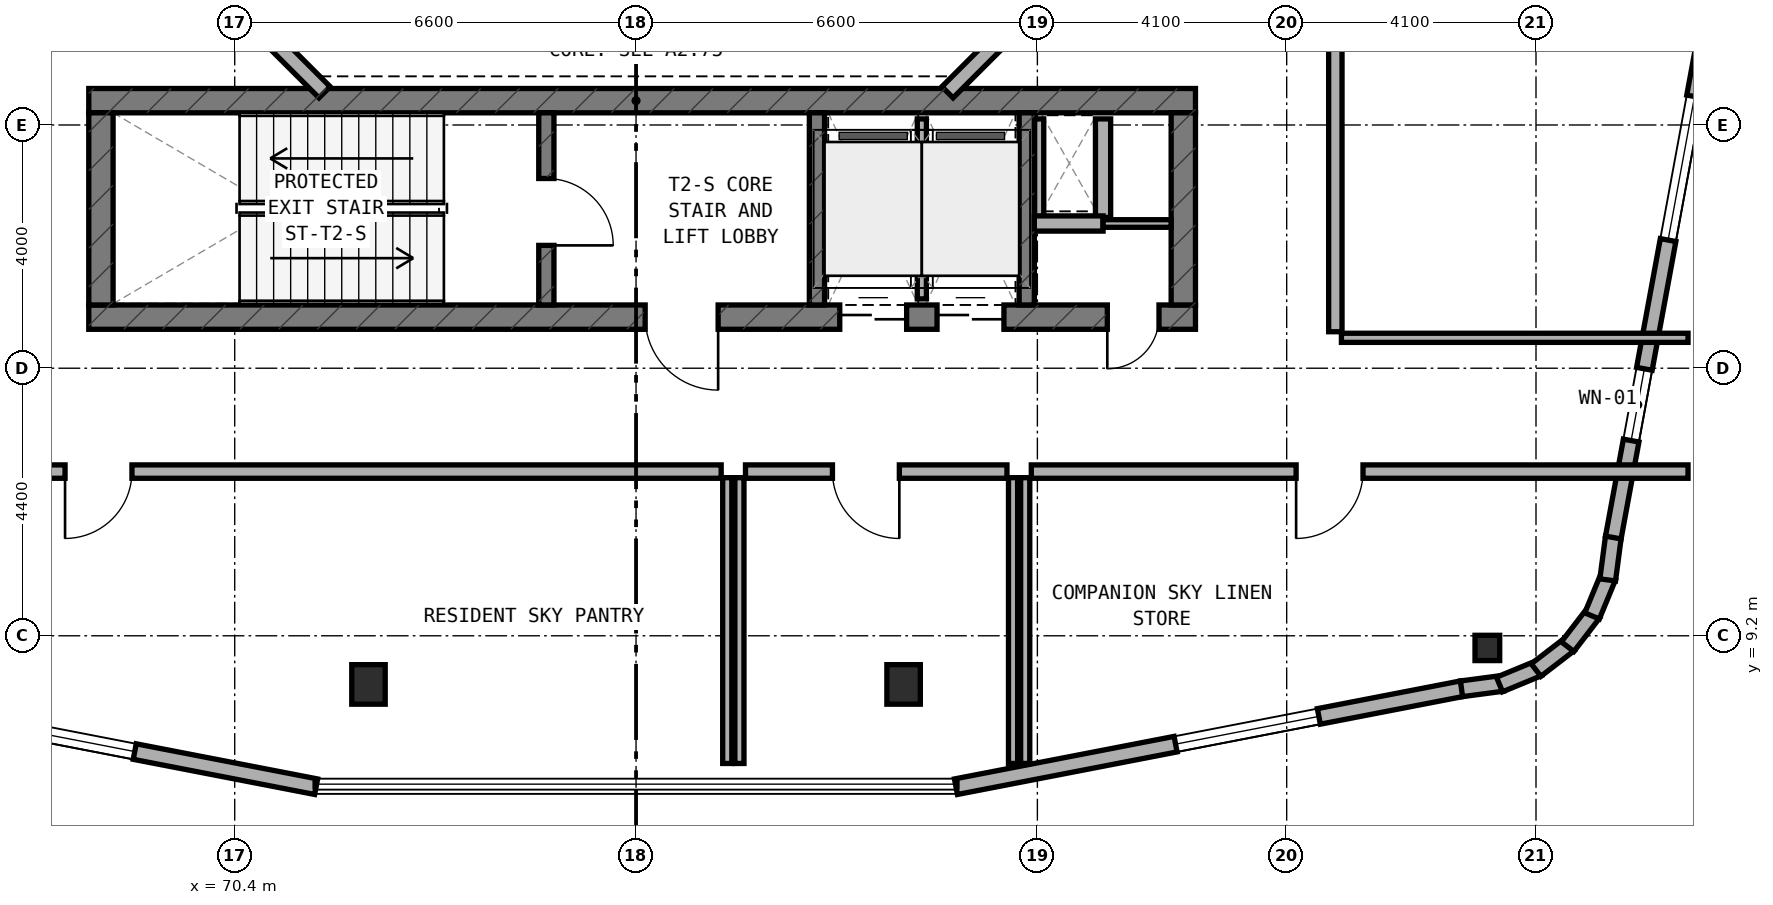
"""IFC4 building model, lengths in metres.
Left out: names, types, materials, properties, quantities, classifications, styles, units other than length and angle.
Written with IfcOpenShell. Run it as: python <this file> out.ifc"""

import sys

from ifc_helpers import new_model, si_unit, direction, frame, frame_2d, origin, origin_2d, place, context, subcontext, project, spatial, rectangle, i_section, extrude, element, fill, save


model = new_model("IFC4")
c1 = context("Model", 3, precision=1e-05, world=origin(), true_north=direction((0.0, 1.0)))
c2 = subcontext(c1, "Body", "Model", "MODEL_VIEW")
j1 = project(units=[si_unit("LENGTHUNIT", "METRE"), si_unit("PLANEANGLEUNIT", "RADIAN")], contexts=[c1])
p1 = place(None, origin())
s1 = spatial("IfcSite", under=j1, at=p1, CompositionType="ELEMENT")
p2 = place(p1, origin())
s2 = spatial("IfcBuilding", under=s1, at=p2, CompositionType="ELEMENT")
p3 = place(p2, frame((0.0, 0.0, 119.5)))
s3 = spatial("IfcBuildingStorey", under=s2, at=p3, CompositionType="ELEMENT", Elevation=119.5)
p4 = place(p3, frame((68.0, 14.44, 0.0), z_axis=(0.0, 0.0, 1.0), x_axis=(1.0, 0.0, 0.0)))
e1 = element("IfcWall", 1, at=p4, inside=s3, PredefinedType="SHEAR", context=c2, shape_type="SweptSolid", body=[
    extrude(rectangle(XDim=18.2, YDim=0.4, at=frame_2d((9.1, 0.0))), origin(), (0.0, 0.0, 1.0), 4.5),
])
p5 = place(p4, frame((9.15, 0.0, 0.0)))
e2 = element("IfcOpeningElement", 2, at=p5, cuts=e1, PredefinedType="OPENING", context=c2, shape_type="SweptSolid", body=[
    extrude(rectangle(XDim=1.2, YDim=2.15, at=frame_2d((0.6, 1.075))), frame((0.0, 0.21, 0.0), z_axis=(0.0, -1.0, 0.0), x_axis=(1.0, 0.0, 0.0)), (0.0, 0.0, 1.0), 0.42),
])
p6 = place(p4, frame((16.75, 0.0, 0.0)))
e3 = element("IfcOpeningElement", 3, at=p6, cuts=e1, PredefinedType="OPENING", context=c2, shape_type="SweptSolid", body=[
    extrude(rectangle(XDim=0.85, YDim=2.1, at=frame_2d((0.425, 1.05))), frame((0.0, 0.21, 0.0), z_axis=(0.0, -1.0, 0.0), x_axis=(1.0, 0.0, 0.0)), (0.0, 0.0, 1.0), 0.42),
])
p7 = place(p4, frame((12.35, 0.0, 0.0)))
e4 = element("IfcOpeningElement", 4, at=p7, cuts=e1, PredefinedType="OPENING", context=c2, shape_type="SweptSolid", body=[
    extrude(rectangle(XDim=1.1, YDim=2.15, at=frame_2d((0.55, 1.075))), frame((0.0, 0.21, 0.0), z_axis=(0.0, -1.0, 0.0), x_axis=(1.0, 0.0, 0.0)), (0.0, 0.0, 1.0), 0.42),
])
p8 = place(p4, frame((13.95, 0.0, 0.0)))
e5 = element("IfcOpeningElement", 5, at=p8, cuts=e1, PredefinedType="OPENING", context=c2, shape_type="SweptSolid", body=[
    extrude(rectangle(XDim=1.1, YDim=2.15, at=frame_2d((0.55, 1.075))), frame((0.0, 0.21, 0.0), z_axis=(0.0, -1.0, 0.0), x_axis=(1.0, 0.0, 0.0)), (0.0, 0.0, 1.0), 0.42),
])
p9 = place(p3, frame((68.0, 18.0, 0.0), z_axis=(0.0, 0.0, 1.0), x_axis=(1.0, 0.0, 0.0)))
e6 = element("IfcWall", 6, at=p9, inside=s3, PredefinedType="SHEAR", context=c2, shape_type="SweptSolid", body=[
    extrude(rectangle(XDim=18.2, YDim=0.4, at=frame_2d((9.1, 0.0))), origin(), (0.0, 0.0, 1.0), 4.5),
])
for number, where, z_axis, x_axis in (
    (7, (68.2, 14.64, 0.0), (0.0, 0.0, 1.0), (0.0, 1.0, 0.0)),
    (8, (86.0, 14.64, 0.0), (0.0, 0.0, 1.0), (0.0, 1.0, 0.0)),
):
    element("IfcWall", number, at=place(p3, frame(where, z_axis=z_axis, x_axis=x_axis)), inside=s3, PredefinedType="SHEAR", context=c2, shape_type="SweptSolid", body=[
        extrude(rectangle(XDim=3.16, YDim=0.4, at=frame_2d((1.58, 0.0))), origin(), (0.0, 0.0, 1.0), 4.5),
    ])
p10 = place(p3, frame((75.525, 14.64, 0.0), z_axis=(0.0, 0.0, 1.0), x_axis=(0.0, 1.0, 0.0)))
e9 = element("IfcWall", 9, at=p10, inside=s3, PredefinedType="STANDARD", context=c2, shape_type="SweptSolid", body=[
    extrude(rectangle(XDim=3.16, YDim=0.25, at=frame_2d((1.58, 0.0))), origin(), (0.0, 0.0, 1.0), 4.25),
])
p11 = place(p10, frame((0.98, 0.0, 0.0)))
e10 = element("IfcOpeningElement", 10, at=p11, cuts=e9, PredefinedType="OPENING", context=c2, shape_type="SweptSolid", body=[
    extrude(rectangle(XDim=1.1, YDim=2.15, at=frame_2d((0.55, 1.075))), frame((0.0, 0.135, 0.0), z_axis=(0.0, -1.0, 0.0), x_axis=(1.0, 0.0, 0.0)), (0.0, 0.0, 1.0), 0.27),
])
for number, where, z_axis, x_axis in (
    (11, (79.975, 14.64, 0.0), (0.0, 0.0, 1.0), (0.0, 1.0, 0.0)),
    (12, (83.425, 14.64, 0.0), (0.0, 0.0, 1.0), (0.0, 1.0, 0.0)),
):
    element("IfcWall", number, at=place(p3, frame(where, z_axis=z_axis, x_axis=x_axis)), inside=s3, PredefinedType="STANDARD", context=c2, shape_type="SweptSolid", body=[
        extrude(rectangle(XDim=3.16, YDim=0.25, at=frame_2d((1.58, 0.0))), origin(), (0.0, 0.0, 1.0), 4.25),
    ])
for number, where, z_axis, x_axis in (
    (13, (72.6, 8.4, 0.0), (0.0, 0.0, 1.0), (1.0, 0.0, 0.0)),
    (14, (81.4, 8.4, 0.0), (0.0, 0.0, 1.0), (1.0, 0.0, 0.0)),
):
    element("IfcColumn", number, at=place(p3, frame(where, z_axis=z_axis, x_axis=x_axis)), inside=s3, PredefinedType="COLUMN", context=c2, shape_type="SweptSolid", body=[
        extrude(rectangle(XDim=0.55, YDim=0.65, at=origin_2d()), origin(), (0.0, 0.0, 1.0), 4.5),
    ])
p12 = place(p3, frame((91.0, 9.0, 0.0), z_axis=(0.0, 0.0, 1.0), x_axis=(1.0, 0.0, 0.0)))
e15 = element("IfcColumn", 15, at=p12, inside=s3, PredefinedType="COLUMN", context=c2, shape_type="SweptSolid", body=[
    extrude(i_section(OverallWidth=0.406, OverallDepth=0.416, WebThickness=0.024, FlangeThickness=0.039, FilletRadius=0.015, at=origin_2d()), origin(), (0.0, 0.0, 1.0), 4.5),
])
p13 = place(p3, frame((63.417, 8.33, 0.0), z_axis=(0.0, 0.0, 1.0), x_axis=(0.981750199588, -0.190175039396, 0.0)))
e16 = element("IfcWall", 16, at=p13, inside=s3, PredefinedType="STANDARD", context=c2, shape_type="SweptSolid", body=[
    extrude(rectangle(XDim=8.477, YDim=0.26, at=frame_2d((4.238, 0.0))), origin(), (0.0, 0.0, 1.0), 4.25),
])
p14 = place(p13, frame((3.038, 0.0, 0.8)))
e17 = element("IfcOpeningElement", 17, at=p14, cuts=e16, PredefinedType="OPENING", context=c2, shape_type="SweptSolid", body=[
    extrude(rectangle(XDim=2.4, YDim=1.6, at=frame_2d((1.2, 0.8))), frame((0.0, 0.14, 0.0), z_axis=(0.0, -1.0, 0.0), x_axis=(1.0, 0.0, 0.0)), (0.0, 0.0, 1.0), 0.28),
])
p15 = place(p3, frame((82.261, 6.718, 0.0), z_axis=(0.0, 0.0, 1.0), x_axis=(0.981750199588, 0.190175039396, 0.0)))
e18 = element("IfcWall", 18, at=p15, inside=s3, PredefinedType="STANDARD", context=c2, shape_type="SweptSolid", body=[
    extrude(rectangle(XDim=8.477, YDim=0.26, at=frame_2d((4.238, 0.0))), origin(), (0.0, 0.0, 1.0), 4.25),
])
p16 = place(p15, frame((3.679, 0.0, 0.8)))
e19 = element("IfcOpeningElement", 19, at=p16, cuts=e18, PredefinedType="OPENING", context=c2, shape_type="SweptSolid", body=[
    extrude(rectangle(XDim=2.4, YDim=1.6, at=frame_2d((1.2, 0.8))), frame((0.0, 0.14, 0.0), z_axis=(0.0, -1.0, 0.0), x_axis=(1.0, 0.0, 0.0)), (0.0, 0.0, 1.0), 0.28),
])
p17 = place(p3, frame((90.575, 8.328, 0.0), z_axis=(0.0, 0.0, 1.0), x_axis=(0.991300187529, 0.13162043232, 0.0)))
e20 = element("IfcWall", 20, at=p17, inside=s3, PredefinedType="STANDARD", context=c2, shape_type="SweptSolid", body=[
    extrude(rectangle(XDim=0.677, YDim=0.26, at=frame_2d((0.338, 0.0))), origin(), (0.0, 0.0, 1.0), 4.25),
])
for number, where, z_axis, x_axis in (
    (21, (91.2, 8.399, 0.0), (0.0, 0.0, 1.0), (0.924, 0.382, 0.0)),
    (22, (91.801, 8.636, 0.0), (0.0, 0.0, 1.0), (0.793, 0.61, 0.0)),
    (23, (92.32, 9.021, 0.0), (0.0, 0.0, 1.0), (0.609, 0.793, 0.0)),
):
    element("IfcWall", number, at=place(p3, frame(where, z_axis=z_axis, x_axis=x_axis)), inside=s3, PredefinedType="STANDARD", context=c2, shape_type="SweptSolid", body=[
        extrude(rectangle(XDim=0.694, YDim=0.26, at=frame_2d((0.347, 0.0))), origin(), (0.0, 0.0, 1.0), 4.25),
    ])
p18 = place(p3, frame((92.722, 9.527, 0.0), z_axis=(0.0, 0.0, 1.0), x_axis=(0.382289608286, 0.924042561464, 0.0)))
e24 = element("IfcWall", 24, at=p18, inside=s3, PredefinedType="STANDARD", context=c2, shape_type="SweptSolid", body=[
    extrude(rectangle(XDim=0.694, YDim=0.26, at=frame_2d((0.347, 0.0))), origin(), (0.0, 0.0, 1.0), 4.25),
])
p19 = place(p3, frame((92.979, 10.119, 0.0), z_axis=(0.0, 0.0, 1.0), x_axis=(0.130614135366, 0.991433279471, 0.0)))
e25 = element("IfcWall", 25, at=p19, inside=s3, PredefinedType="STANDARD", context=c2, shape_type="SweptSolid", body=[
    extrude(rectangle(XDim=0.712, YDim=0.26, at=frame_2d((0.356, 0.0))), origin(), (0.0, 0.0, 1.0), 4.25),
])
p20 = place(p3, frame((93.071, 10.816, 0.0), z_axis=(0.0, 0.0, 1.0), x_axis=(0.181209963057, 0.983444431215, 0.0)))
e26 = element("IfcWall", 26, at=p20, inside=s3, PredefinedType="STANDARD", context=c2, shape_type="SweptSolid", body=[
    extrude(rectangle(XDim=8.889, YDim=0.26, at=frame_2d((4.445, 0.0))), origin(), (0.0, 0.0, 1.0), 4.25),
])
p21 = place(p20, frame((1.621, 0.0, 0.85)))
e27 = element("IfcOpeningElement", 27, at=p21, cuts=e26, PredefinedType="OPENING", context=c2, shape_type="SweptSolid", body=[
    extrude(rectangle(XDim=1.2, YDim=1.5, at=frame_2d((0.6, 0.75))), frame((0.0, 0.14, 0.0), z_axis=(0.0, -1.0, 0.0), x_axis=(1.0, 0.0, 0.0)), (0.0, 0.0, 1.0), 0.28),
])
p22 = place(p20, frame((4.974, 0.0, 0.8)))
e28 = element("IfcOpeningElement", 28, at=p22, cuts=e26, PredefinedType="OPENING", context=c2, shape_type="SweptSolid", body=[
    extrude(rectangle(XDim=2.4, YDim=1.6, at=frame_2d((1.2, 0.8))), frame((0.0, 0.14, 0.0), z_axis=(0.0, -1.0, 0.0), x_axis=(1.0, 0.0, 0.0)), (0.0, 0.0, 1.0), 0.28),
])
for number, where, z_axis, x_axis in (
    (29, (82.122, 18.138, 0.0), (0.0, 0.0, 1.0), (0.707, 0.707, 0.0)),
    (30, (70.244, 19.772, 0.0), (0.0, 0.0, 1.0), (0.707, -0.707, 0.0)),
):
    element("IfcWall", number, at=place(p3, frame(where, z_axis=z_axis, x_axis=x_axis)), inside=s3, PredefinedType="STANDARD", context=c2, shape_type="SweptSolid", body=[
        extrude(rectangle(XDim=2.311, YDim=0.26, at=frame_2d((1.155, 0.0))), origin(), (0.0, 0.0, 1.0), 4.25),
    ])
p23 = place(p3, frame((83.63, 16.08, 0.0), z_axis=(0.0, 0.0, 1.0), x_axis=(0.0, 1.0, 0.0)))
e31 = element("IfcWall", 31, at=p23, inside=s3, PredefinedType="PARTITIONING", context=c2, shape_type="SweptSolid", body=[
    extrude(rectangle(XDim=1.62, YDim=0.15, at=frame_2d((0.81, 0.0))), origin(), (0.0, 0.0, 1.0), 3.825),
])
p24 = place(p3, frame((84.68, 16.08, 0.0), z_axis=(0.0, 0.0, 1.0), x_axis=(0.0, 1.0, 0.0)))
e32 = element("IfcWall", 32, at=p24, inside=s3, PredefinedType="SOLIDWALL", context=c2, shape_type="SweptSolid", body=[
    extrude(rectangle(XDim=1.62, YDim=0.25, at=frame_2d((0.81, 0.0))), origin(), (0.0, 0.0, 1.0), 4.22),
])
p25 = place(p3, frame((83.55, 15.98, 0.0), z_axis=(0.0, 0.0, 1.0), x_axis=(1.0, 0.0, 0.0)))
e33 = element("IfcWall", 33, at=p25, inside=s3, PredefinedType="SOLIDWALL", context=c2, shape_type="SweptSolid", body=[
    extrude(rectangle(XDim=1.13, YDim=0.25, at=frame_2d((0.565, 0.0))), origin(), (0.0, 0.0, 1.0), 4.22),
])
p26 = place(p3, frame((84.68, 15.98, 0.0), z_axis=(0.0, 0.0, 1.0), x_axis=(1.0, 0.0, 0.0)))
e34 = element("IfcWall", 34, at=p26, inside=s3, PredefinedType="PARTITIONING", context=c2, shape_type="SweptSolid", body=[
    extrude(rectangle(XDim=1.12, YDim=0.125, at=frame_2d((0.56, 0.0))), origin(), (0.0, 0.0, 1.0), 4.22),
])
p27 = place(p3, frame((81.7, 14.74, 0.0), z_axis=(0.0, 0.0, 1.0), x_axis=(0.0, 1.0, 0.0)))
e35 = element("IfcWall", 35, at=p27, inside=s3, PredefinedType="PARTITIONING", context=c2, shape_type="SweptSolid", body=[
    extrude(rectangle(XDim=2.96, YDim=0.15, at=frame_2d((1.48, 0.0))), origin(), (0.0, 0.0, 1.0), 4.22),
])
p28 = place(p3, frame((88.6, 14.1, 0.0), z_axis=(0.0, 0.0, 1.0), x_axis=(1.0, 0.0, 0.0)))
e36 = element("IfcWall", 36, at=p28, inside=s3, PredefinedType="PARTITIONING", context=c2, shape_type="SweptSolid", body=[
    extrude(rectangle(XDim=5.7, YDim=0.15, at=frame_2d((2.85, 0.0))), origin(), (0.0, 0.0, 1.0), 3.945),
])
p29 = place(p3, frame((88.5, 14.2, 0.0), z_axis=(0.0, 0.0, 1.0), x_axis=(0.0, 1.0, 0.0)))
e37 = element("IfcWall", 37, at=p29, inside=s3, PredefinedType="SOLIDWALL", context=c2, shape_type="SweptSolid", body=[
    extrude(rectangle(XDim=21.6, YDim=0.22, at=frame_2d((10.8, 0.0))), origin(), (0.0, 0.0, 1.0), 3.825),
])
p30 = place(p29, frame((9.215, 0.0, 0.0)))
e38 = element("IfcOpeningElement", 38, at=p30, cuts=e37, PredefinedType="OPENING", context=c2, shape_type="SweptSolid", body=[
    extrude(rectangle(XDim=1.1, YDim=2.1, at=frame_2d((0.55, 1.05))), frame((0.0, 0.12, 0.0), z_axis=(0.0, -1.0, 0.0), x_axis=(1.0, 0.0, 0.0)), (0.0, 0.0, 1.0), 0.24),
])
p31 = place(p3, frame((78.5, 7.1, 0.0), z_axis=(0.0, 0.0, 1.0), x_axis=(0.0, 1.0, 0.0)))
e39 = element("IfcWall", 39, at=p31, inside=s3, PredefinedType="PARTITIONING", context=c2, shape_type="SweptSolid", body=[
    extrude(rectangle(XDim=4.7, YDim=0.15, at=frame_2d((2.35, 0.0))), origin(), (0.0, 0.0, 1.0), 3.945),
])
p32 = place(p3, frame((59.7, 11.9, 0.0), z_axis=(0.0, 0.0, 1.0), x_axis=(1.0, 0.0, 0.0)))
e40 = element("IfcWall", 40, at=p32, inside=s3, PredefinedType="SOLIDWALL", context=c2, shape_type="SweptSolid", body=[
    extrude(rectangle(XDim=18.7, YDim=0.22, at=frame_2d((9.35, 0.0))), origin(), (0.0, 0.0, 1.0), 3.825),
])
p33 = place(p32, frame((7.91, 0.0, 0.0)))
e41 = element("IfcOpeningElement", 41, at=p33, cuts=e40, PredefinedType="OPENING", context=c2, shape_type="SweptSolid", body=[
    extrude(rectangle(XDim=1.1, YDim=2.1, at=frame_2d((0.55, 1.05))), frame((0.0, 0.12, 0.0), z_axis=(0.0, -1.0, 0.0), x_axis=(1.0, 0.0, 0.0)), (0.0, 0.0, 1.0), 0.24),
])
for number, where, z_axis, x_axis in (
    (42, (78.7, 7.1, 0.0), (0.0, 0.0, 1.0), (0.0, 1.0, 0.0)),
    (43, (83.2, 7.1, 0.0), (0.0, 0.0, 1.0), (0.0, 1.0, 0.0)),
):
    element("IfcWall", number, at=place(p3, frame(where, z_axis=z_axis, x_axis=x_axis)), inside=s3, PredefinedType="PARTITIONING", context=c2, shape_type="SweptSolid", body=[
        extrude(rectangle(XDim=4.7, YDim=0.15, at=frame_2d((2.35, 0.0))), origin(), (0.0, 0.0, 1.0), 3.945),
    ])
p34 = place(p3, frame((78.8, 11.9, 0.0), z_axis=(0.0, 0.0, 1.0), x_axis=(1.0, 0.0, 0.0)))
e44 = element("IfcWall", 44, at=p34, inside=s3, PredefinedType="SOLIDWALL", context=c2, shape_type="SweptSolid", body=[
    extrude(rectangle(XDim=4.3, YDim=0.22, at=frame_2d((2.15, 0.0))), origin(), (0.0, 0.0, 1.0), 3.825),
])
p35 = place(p34, frame((1.43, 0.0, 0.0)))
e45 = element("IfcOpeningElement", 45, at=p35, cuts=e44, PredefinedType="OPENING", context=c2, shape_type="SweptSolid", body=[
    extrude(rectangle(XDim=1.1, YDim=2.1, at=frame_2d((0.55, 1.05))), frame((0.0, 0.12, 0.0), z_axis=(0.0, -1.0, 0.0), x_axis=(1.0, 0.0, 0.0)), (0.0, 0.0, 1.0), 0.24),
])
p36 = place(p3, frame((83.4, 7.1, 0.0), z_axis=(0.0, 0.0, 1.0), x_axis=(0.0, 1.0, 0.0)))
e46 = element("IfcWall", 46, at=p36, inside=s3, PredefinedType="PARTITIONING", context=c2, shape_type="SweptSolid", body=[
    extrude(rectangle(XDim=4.7, YDim=0.15, at=frame_2d((2.35, 0.0))), origin(), (0.0, 0.0, 1.0), 3.945),
])
p37 = place(p3, frame((83.5, 11.9, 0.0), z_axis=(0.0, 0.0, 1.0), x_axis=(1.0, 0.0, 0.0)))
e47 = element("IfcWall", 47, at=p37, inside=s3, PredefinedType="SOLIDWALL", context=c2, shape_type="SweptSolid", body=[
    extrude(rectangle(XDim=10.8, YDim=0.22, at=frame_2d((5.4, 0.0))), origin(), (0.0, 0.0, 1.0), 3.945),
])
p38 = place(p37, frame((4.355, 0.0, 0.0)))
e48 = element("IfcOpeningElement", 48, at=p38, cuts=e47, PredefinedType="OPENING", context=c2, shape_type="SweptSolid", body=[
    extrude(rectangle(XDim=1.1, YDim=2.1, at=frame_2d((0.55, 1.05))), frame((0.0, 0.12, 0.0), z_axis=(0.0, -1.0, 0.0), x_axis=(1.0, 0.0, 0.0)), (0.0, 0.0, 1.0), 0.24),
])
p39 = place(p14, origin())
e49 = element("IfcWindow", 49, at=p39, inside=s3, PartitioningType="SINGLE_PANEL", PredefinedType="WINDOW", context=c2, shape_type="SweptSolid", body=[
    extrude(rectangle(XDim=2.4, YDim=1.6, at=frame_2d((1.2, 0.8))), frame((0.0, 0.03, 0.0), z_axis=(0.0, -1.0, 0.0), x_axis=(1.0, 0.0, 0.0)), (0.0, 0.0, 1.0), 0.06),
])
fill(e17, e49)
p40 = place(p16, origin())
e50 = element("IfcWindow", 50, at=p40, inside=s3, PartitioningType="SINGLE_PANEL", PredefinedType="WINDOW", context=c2, shape_type="SweptSolid", body=[
    extrude(rectangle(XDim=2.4, YDim=1.6, at=frame_2d((1.2, 0.8))), frame((0.0, 0.03, 0.0), z_axis=(0.0, -1.0, 0.0), x_axis=(1.0, 0.0, 0.0)), (0.0, 0.0, 1.0), 0.06),
])
fill(e19, e50)
p41 = place(p21, origin())
e51 = element("IfcWindow", 51, at=p41, inside=s3, PartitioningType="SINGLE_PANEL", PredefinedType="WINDOW", context=c2, shape_type="SweptSolid", body=[
    extrude(rectangle(XDim=1.2, YDim=1.5, at=frame_2d((0.6, 0.75))), frame((0.0, 0.03, 0.0), z_axis=(0.0, -1.0, 0.0), x_axis=(1.0, 0.0, 0.0)), (0.0, 0.0, 1.0), 0.06),
])
fill(e27, e51)
p42 = place(p22, origin())
e52 = element("IfcWindow", 52, at=p42, inside=s3, PartitioningType="SINGLE_PANEL", PredefinedType="WINDOW", context=c2, shape_type="SweptSolid", body=[
    extrude(rectangle(XDim=2.4, YDim=1.6, at=frame_2d((1.2, 0.8))), frame((0.0, 0.03, 0.0), z_axis=(0.0, -1.0, 0.0), x_axis=(1.0, 0.0, 0.0)), (0.0, 0.0, 1.0), 0.06),
])
fill(e28, e52)
p43 = place(p11, frame((1.1, 0.0, 0.0), z_axis=(0.0, 0.0, 1.0), x_axis=(-1.0, 0.0, 0.0)))
e53 = element("IfcDoor", 53, at=p43, inside=s3, OperationType="SINGLE_SWING_RIGHT", PredefinedType="DOOR", context=c2, shape_type="SweptSolid", body=[
    extrude(rectangle(XDim=1.1, YDim=2.15, at=frame_2d((0.55, 1.075))), frame((0.0, 0.025, 0.0), z_axis=(0.0, -1.0, 0.0), x_axis=(1.0, 0.0, 0.0)), (0.0, 0.0, 1.0), 0.05),
])
fill(e10, e53)
p44 = place(p5, frame((1.2, 0.0, 0.0), z_axis=(0.0, 0.0, 1.0), x_axis=(-1.0, 0.0, 0.0)))
e54 = element("IfcDoor", 54, at=p44, inside=s3, OperationType="SINGLE_SWING_LEFT", PredefinedType="DOOR", context=c2, shape_type="SweptSolid", body=[
    extrude(rectangle(XDim=1.2, YDim=2.15, at=frame_2d((0.6, 1.075))), frame((0.0, 0.025, 0.0), z_axis=(0.0, -1.0, 0.0), x_axis=(1.0, 0.0, 0.0)), (0.0, 0.0, 1.0), 0.05),
])
fill(e2, e54)
p45 = place(p6, frame((0.85, 0.0, 0.0), z_axis=(0.0, 0.0, 1.0), x_axis=(-1.0, 0.0, 0.0)))
e55 = element("IfcDoor", 55, at=p45, inside=s3, OperationType="SINGLE_SWING_RIGHT", PredefinedType="DOOR", context=c2, shape_type="SweptSolid", body=[
    extrude(rectangle(XDim=0.85, YDim=2.1, at=frame_2d((0.425, 1.05))), frame((0.0, 0.025, 0.0), z_axis=(0.0, -1.0, 0.0), x_axis=(1.0, 0.0, 0.0)), (0.0, 0.0, 1.0), 0.05),
])
fill(e3, e55)
p46 = place(p7, frame((1.1, 0.0, 0.0), z_axis=(0.0, 0.0, 1.0), x_axis=(-1.0, 0.0, 0.0)))
e56 = element("IfcDoor", 56, at=p46, inside=s3, OperationType="DOUBLE_DOOR_SLIDING", PredefinedType="DOOR", context=c2, shape_type="SweptSolid", body=[
    extrude(rectangle(XDim=1.1, YDim=2.15, at=frame_2d((0.55, 1.075))), frame((0.0, 0.025, 0.0), z_axis=(0.0, -1.0, 0.0), x_axis=(1.0, 0.0, 0.0)), (0.0, 0.0, 1.0), 0.05),
])
fill(e4, e56)
p47 = place(p8, frame((1.1, 0.0, 0.0), z_axis=(0.0, 0.0, 1.0), x_axis=(-1.0, 0.0, 0.0)))
e57 = element("IfcDoor", 57, at=p47, inside=s3, OperationType="DOUBLE_DOOR_SLIDING", PredefinedType="DOOR", context=c2, shape_type="SweptSolid", body=[
    extrude(rectangle(XDim=1.1, YDim=2.15, at=frame_2d((0.55, 1.075))), frame((0.0, 0.025, 0.0), z_axis=(0.0, -1.0, 0.0), x_axis=(1.0, 0.0, 0.0)), (0.0, 0.0, 1.0), 0.05),
])
fill(e5, e57)
p48 = place(p33, frame((1.1, 0.0, 0.0), z_axis=(0.0, 0.0, 1.0), x_axis=(-1.0, 0.0, 0.0)))
e58 = element("IfcDoor", 58, at=p48, inside=s3, OperationType="SINGLE_SWING_RIGHT", PredefinedType="DOOR", context=c2, shape_type="SweptSolid", body=[
    extrude(rectangle(XDim=1.1, YDim=2.1, at=frame_2d((0.55, 1.05))), frame((0.0, 0.025, 0.0), z_axis=(0.0, -1.0, 0.0), x_axis=(1.0, 0.0, 0.0)), (0.0, 0.0, 1.0), 0.05),
])
fill(e41, e58)
p49 = place(p35, frame((1.1, 0.0, 0.0), z_axis=(0.0, 0.0, 1.0), x_axis=(-1.0, 0.0, 0.0)))
e59 = element("IfcDoor", 59, at=p49, inside=s3, OperationType="SINGLE_SWING_LEFT", PredefinedType="DOOR", context=c2, shape_type="SweptSolid", body=[
    extrude(rectangle(XDim=1.1, YDim=2.1, at=frame_2d((0.55, 1.05))), frame((0.0, 0.025, 0.0), z_axis=(0.0, -1.0, 0.0), x_axis=(1.0, 0.0, 0.0)), (0.0, 0.0, 1.0), 0.05),
])
fill(e45, e59)
p50 = place(p38, frame((1.1, 0.0, 0.0), z_axis=(0.0, 0.0, 1.0), x_axis=(-1.0, 0.0, 0.0)))
e60 = element("IfcDoor", 60, at=p50, inside=s3, OperationType="SINGLE_SWING_RIGHT", PredefinedType="DOOR", context=c2, shape_type="SweptSolid", body=[
    extrude(rectangle(XDim=1.1, YDim=2.1, at=frame_2d((0.55, 1.05))), frame((0.0, 0.025, 0.0), z_axis=(0.0, -1.0, 0.0), x_axis=(1.0, 0.0, 0.0)), (0.0, 0.0, 1.0), 0.05),
])
fill(e48, e60)
save(model, sys.argv[1])
